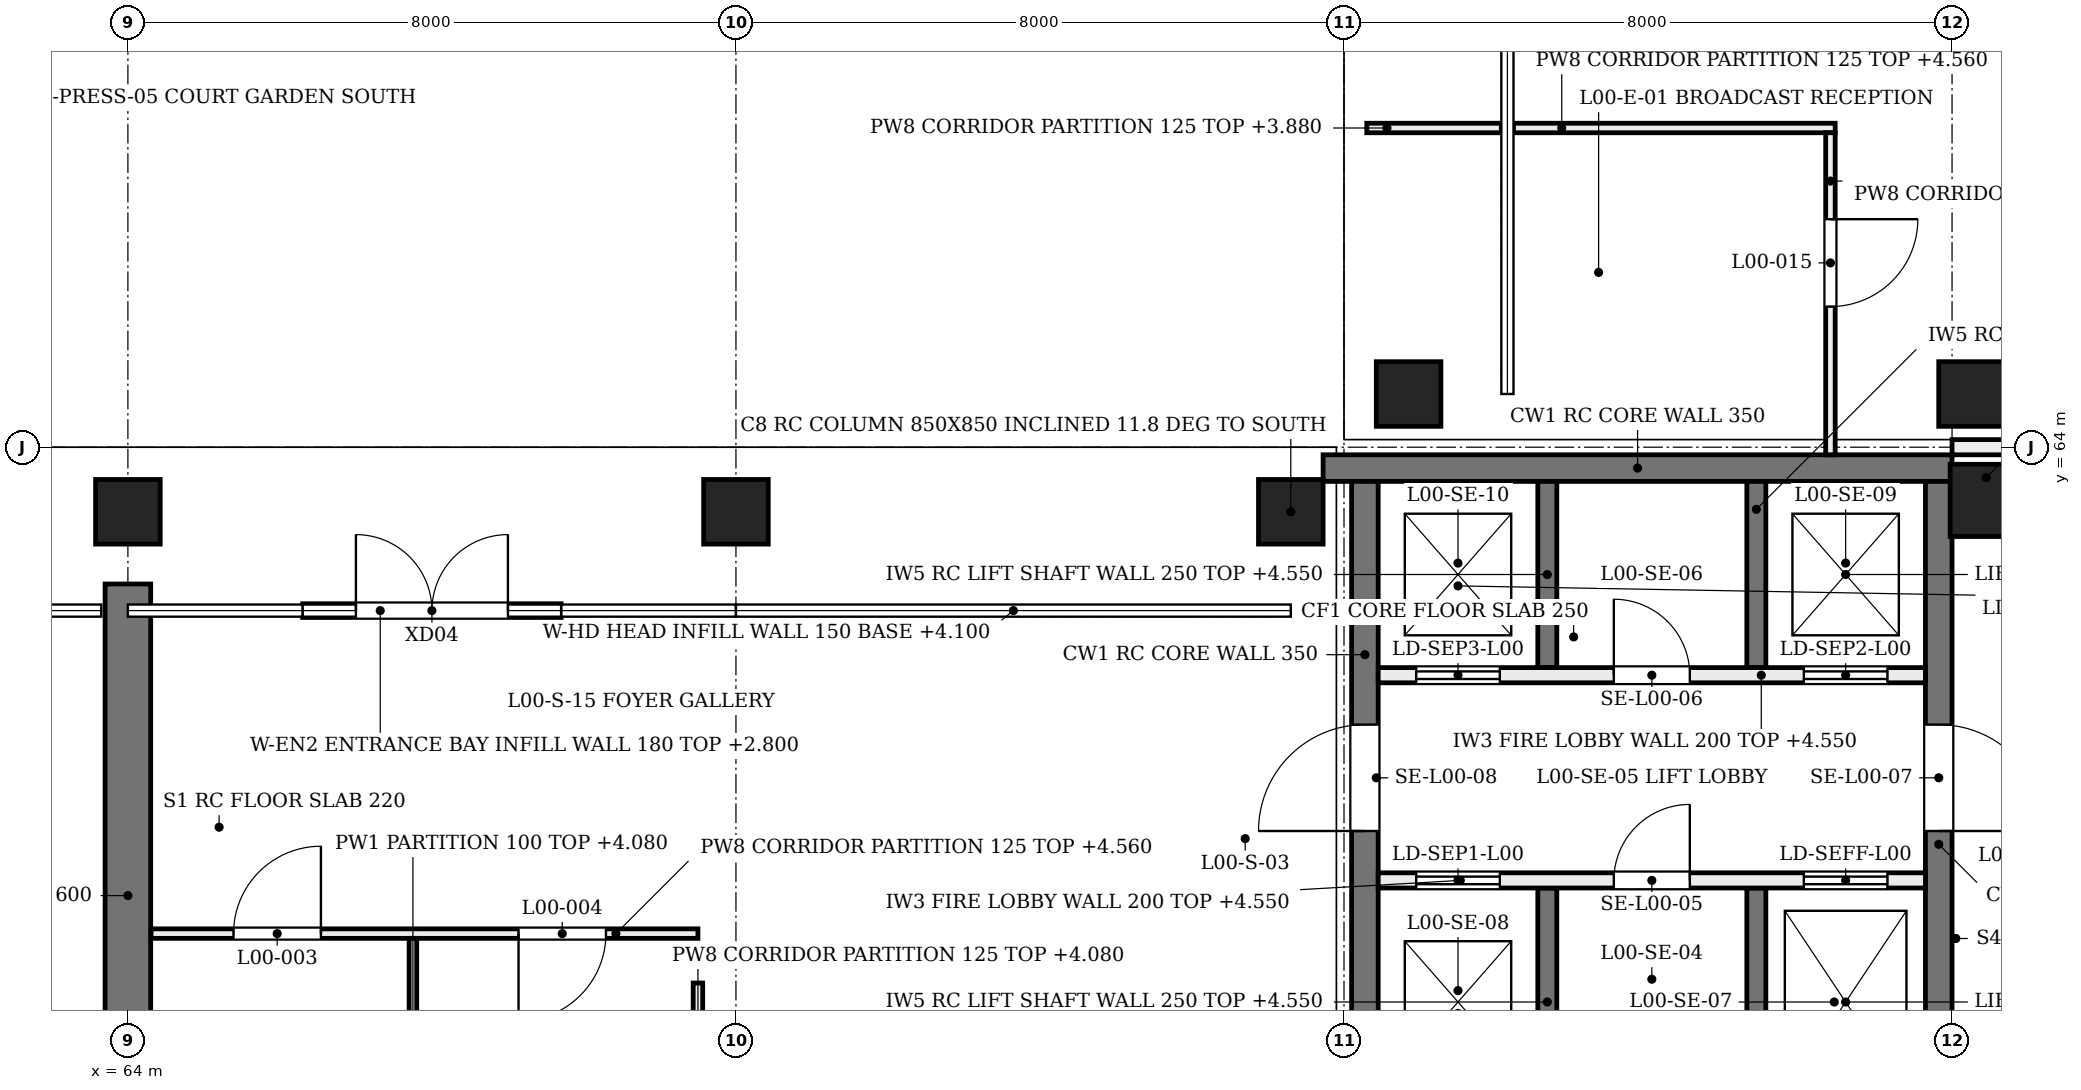
"""IFC4 building model, lengths in metres.
Left out: names, types, materials, properties, quantities, classifications, styles, units other than length and angle.
Written with IfcOpenShell. Run it as: python <this file> out.ifc"""

import sys

from ifc_helpers import new_model, si_unit, direction, frame, frame_2d, origin, origin_2d, place, context, subcontext, project, spatial, rectangle, extrude, element, fill, save


model = new_model("IFC4")
c1 = context("Model", 3, precision=1e-05, world=origin(), true_north=direction((0.0, 1.0)))
c2 = subcontext(c1, "Body", "Model", "MODEL_VIEW")
j1 = project(units=[si_unit("LENGTHUNIT", "METRE"), si_unit("PLANEANGLEUNIT", "RADIAN")], contexts=[c1])
p1 = place(None, origin())
s1 = spatial("IfcSite", under=j1, at=p1, CompositionType="ELEMENT")
p2 = place(p1, origin())
s2 = spatial("IfcBuilding", under=s1, at=p2, CompositionType="ELEMENT")
p3 = place(p2, origin())
s3 = spatial("IfcBuildingStorey", under=s2, at=p3, CompositionType="ELEMENT", Elevation=0.0)
p4 = place(p3, frame((64.0, 49.2, 0.0), z_axis=(0.0, 0.0, 1.0), x_axis=(0.0, 1.0, 0.0)))
e1 = element("IfcWall", 1, at=p4, inside=s3, PredefinedType="SHEAR", context=c2, shape_type="SweptSolid", body=[
    extrude(rectangle(XDim=13.0, YDim=0.6, at=frame_2d((6.5, 0.0))), origin(), (0.0, 0.0, 1.0), 4.58),
])
p5 = place(p3, frame((79.725, 63.725, 0.0), z_axis=(0.0, 0.0, 1.0), x_axis=(1.0, 0.0, 0.0)))
e2 = element("IfcWall", 2, at=p5, inside=s3, PredefinedType="SHEAR", context=c2, shape_type="SweptSolid", body=[
    extrude(rectangle(XDim=8.275, YDim=0.35, at=frame_2d((4.137, 0.0))), origin(), (0.0, 0.0, 1.0), 4.58),
])
p6 = place(p3, frame((80.275, 48.35, 0.0), z_axis=(0.0, 0.0, 1.0), x_axis=(0.0, 1.0, 0.0)))
e3 = element("IfcWall", 3, at=p6, inside=s3, PredefinedType="SHEAR", context=c2, shape_type="SweptSolid", body=[
    extrude(rectangle(XDim=15.2, YDim=0.35, at=frame_2d((7.6, 0.0))), origin(), (0.0, 0.0, 1.0), 4.58),
])
p7 = place(p6, frame((0.95, 0.0, 0.0)))
e4 = element("IfcOpeningElement", 4, at=p7, cuts=e3, PredefinedType="OPENING", context=c2, shape_type="SweptSolid", body=[
    extrude(rectangle(XDim=1.0, YDim=2.1, at=frame_2d((0.5, 1.05))), frame((0.0, 0.185, 0.0), z_axis=(0.0, -1.0, 0.0), x_axis=(1.0, 0.0, 0.0)), (0.0, 0.0, 1.0), 0.37),
])
p8 = place(p6, frame((10.6, 0.0, 0.0)))
e5 = element("IfcOpeningElement", 5, at=p8, cuts=e3, PredefinedType="OPENING", context=c2, shape_type="SweptSolid", body=[
    extrude(rectangle(XDim=1.4, YDim=2.1, at=frame_2d((0.7, 1.05))), frame((0.0, 0.185, 0.0), z_axis=(0.0, -1.0, 0.0), x_axis=(1.0, 0.0, 0.0)), (0.0, 0.0, 1.0), 0.37),
])
p9 = place(p3, frame((87.825, 48.35, 0.0), z_axis=(0.0, 0.0, 1.0), x_axis=(0.0, 1.0, 0.0)))
e6 = element("IfcWall", 6, at=p9, inside=s3, PredefinedType="SHEAR", context=c2, shape_type="SweptSolid", body=[
    extrude(rectangle(XDim=15.2, YDim=0.35, at=frame_2d((7.6, 0.0))), origin(), (0.0, 0.0, 1.0), 4.58),
])
p10 = place(p9, frame((0.95, 0.0, 0.0)))
e7 = element("IfcOpeningElement", 7, at=p10, cuts=e6, PredefinedType="OPENING", context=c2, shape_type="SweptSolid", body=[
    extrude(rectangle(XDim=1.0, YDim=2.1, at=frame_2d((0.5, 1.05))), frame((0.0, 0.185, 0.0), z_axis=(0.0, -1.0, 0.0), x_axis=(1.0, 0.0, 0.0)), (0.0, 0.0, 1.0), 0.37),
])
p11 = place(p9, frame((10.6, 0.0, 0.0)))
e8 = element("IfcOpeningElement", 8, at=p11, cuts=e6, PredefinedType="OPENING", context=c2, shape_type="SweptSolid", body=[
    extrude(rectangle(XDim=1.4, YDim=2.1, at=frame_2d((0.7, 1.05))), frame((0.0, 0.185, 0.0), z_axis=(0.0, -1.0, 0.0), x_axis=(1.0, 0.0, 0.0)), (0.0, 0.0, 1.0), 0.37),
])
p12 = place(p3, frame((88.45, 63.3, 0.0), z_axis=(0.0, 0.0, 1.0), x_axis=(1.0, 0.0, 0.0)))
e9 = element("IfcColumn", 9, at=p12, inside=s3, PredefinedType="COLUMN", context=c2, shape_type="SweptSolid", body=[
    extrude(rectangle(XDim=0.95, YDim=0.95, at=origin_2d()), origin(), (0.0, 0.0, 1.0), 4.8),
])
for number, where, z_axis, x_axis in (
    (10, (64.0, 63.4, 0.0), (0.0, -0.204, 0.979), (1.0, 0.0, 0.0)),
    (11, (72.0, 63.4, 0.0), (0.0, -0.204, 0.979), (1.0, 0.0, 0.0)),
    (12, (79.3, 63.4, 0.0), (0.0, -0.204, 0.979), (1.0, 0.0, 0.0)),
):
    element("IfcColumn", number, at=place(p3, frame(where, z_axis=z_axis, x_axis=x_axis)), inside=s3, PredefinedType="COLUMN", context=c2, shape_type="SweptSolid", body=[
        extrude(rectangle(XDim=0.85, YDim=0.85, at=origin_2d()), origin(), (0.0, 0.0, 1.0), 4.903),
    ])
for number, where, z_axis, x_axis in (
    (13, (80.267, 64.7, -1.6), (0.204, 0.0, 0.979), (0.0, 1.0, 0.0)),
    (14, (87.667, 64.7, -1.6), (0.204, 0.0, 0.979), (0.0, 1.0, 0.0)),
):
    element("IfcColumn", number, at=place(p3, frame(where, z_axis=z_axis, x_axis=x_axis)), inside=s3, PredefinedType="COLUMN", context=c2, shape_type="SweptSolid", body=[
        extrude(rectangle(XDim=0.85, YDim=0.85, at=origin_2d()), origin(), (0.0, 0.0, 1.0), 6.538),
    ])
p13 = place(p3, frame((66.3, 61.85, 0.0), z_axis=(0.0, 0.0, 1.0), x_axis=(1.0, 0.0, 0.0)))
e15 = element("IfcWall", 15, at=p13, inside=s3, PredefinedType="SOLIDWALL", context=c2, shape_type="SweptSolid", body=[
    extrude(rectangle(XDim=3.4, YDim=0.18, at=frame_2d((1.7, 0.0))), origin(), (0.0, 0.0, 1.0), 2.8),
])
p14 = place(p13, frame((0.7, 0.0, 0.0)))
e16 = element("IfcOpeningElement", 16, at=p14, cuts=e15, PredefinedType="OPENING", context=c2, shape_type="SweptSolid", body=[
    extrude(rectangle(XDim=2.0, YDim=2.4, at=frame_2d((1.0, 1.2))), frame((0.0, 0.1, 0.0), z_axis=(0.0, -1.0, 0.0), x_axis=(1.0, 0.0, 0.0)), (0.0, 0.0, 1.0), 0.2),
])
for number, where, z_axis, x_axis in (
    (17, (72.2, 61.85, 4.1), (0.0, 0.0, 1.0), (1.0, 0.0, 0.0)),
    (18, (82.15, 64.9, 4.1), (0.0, 0.0, 1.0), (0.0, 1.0, 0.0)),
):
    element("IfcWall", number, at=place(p3, frame(where, z_axis=z_axis, x_axis=x_axis)), inside=s3, PredefinedType="SOLIDWALL", context=c2, shape_type="SweptSolid", body=[
        extrude(rectangle(XDim=6.9, YDim=0.15, at=frame_2d((3.45, 0.0))), origin(), (0.0, 0.0, 1.0), 0.48),
    ])
p15 = place(p3, frame((85.425, 55.2, 0.0), z_axis=(0.0, 0.0, 1.0), x_axis=(0.0, 1.0, 0.0)))
e19 = element("IfcWall", 19, at=p15, inside=s3, PredefinedType="SOLIDWALL", context=c2, shape_type="SweptSolid", body=[
    extrude(rectangle(XDim=3.0, YDim=0.25, at=frame_2d((1.5, 0.0))), origin(), (0.0, 0.0, 1.0), 4.55),
])
p16 = place(p3, frame((85.425, 61.1, 0.0), z_axis=(0.0, 0.0, 1.0), x_axis=(0.0, 1.0, 0.0)))
e20 = element("IfcWall", 20, at=p16, inside=s3, PredefinedType="SOLIDWALL", context=c2, shape_type="SweptSolid", body=[
    extrude(rectangle(XDim=2.45, YDim=0.25, at=frame_2d((1.225, 0.0))), origin(), (0.0, 0.0, 1.0), 4.55),
])
p17 = place(p3, frame((82.675, 55.2, 0.0), z_axis=(0.0, 0.0, 1.0), x_axis=(0.0, 1.0, 0.0)))
e21 = element("IfcWall", 21, at=p17, inside=s3, PredefinedType="SOLIDWALL", context=c2, shape_type="SweptSolid", body=[
    extrude(rectangle(XDim=3.0, YDim=0.25, at=frame_2d((1.5, 0.0))), origin(), (0.0, 0.0, 1.0), 4.55),
])
p18 = place(p3, frame((82.675, 61.1, 0.0), z_axis=(0.0, 0.0, 1.0), x_axis=(0.0, 1.0, 0.0)))
e22 = element("IfcWall", 22, at=p18, inside=s3, PredefinedType="SOLIDWALL", context=c2, shape_type="SweptSolid", body=[
    extrude(rectangle(XDim=2.45, YDim=0.25, at=frame_2d((1.225, 0.0))), origin(), (0.0, 0.0, 1.0), 4.55),
])
p19 = place(p3, frame((87.65, 58.3, 0.0), z_axis=(0.0, 0.0, 1.0), x_axis=(-1.0, 0.0, 0.0)))
e23 = element("IfcWall", 23, at=p19, inside=s3, PredefinedType="SOLIDWALL", context=c2, shape_type="SweptSolid", body=[
    extrude(rectangle(XDim=7.2, YDim=0.2, at=frame_2d((3.6, 0.0))), origin(), (0.0, 0.0, 1.0), 4.55),
])
p20 = place(p19, frame((0.5, 0.0, 0.0)))
e24 = element("IfcOpeningElement", 24, at=p20, cuts=e23, PredefinedType="OPENING", context=c2, shape_type="SweptSolid", body=[
    extrude(rectangle(XDim=1.1, YDim=2.1, at=frame_2d((0.55, 1.05))), frame((0.0, 0.11, 0.0), z_axis=(0.0, -1.0, 0.0), x_axis=(1.0, 0.0, 0.0)), (0.0, 0.0, 1.0), 0.22),
])
p21 = place(p19, frame((5.6, 0.0, 0.0)))
e25 = element("IfcOpeningElement", 25, at=p21, cuts=e23, PredefinedType="OPENING", context=c2, shape_type="SweptSolid", body=[
    extrude(rectangle(XDim=1.1, YDim=2.1, at=frame_2d((0.55, 1.05))), frame((0.0, 0.11, 0.0), z_axis=(0.0, -1.0, 0.0), x_axis=(1.0, 0.0, 0.0)), (0.0, 0.0, 1.0), 0.22),
])
p22 = place(p19, frame((3.1, 0.0, 0.0)))
e26 = element("IfcOpeningElement", 26, at=p22, cuts=e23, PredefinedType="OPENING", context=c2, shape_type="SweptSolid", body=[
    extrude(rectangle(XDim=1.0, YDim=2.1, at=frame_2d((0.5, 1.05))), frame((0.0, 0.11, 0.0), z_axis=(0.0, -1.0, 0.0), x_axis=(1.0, 0.0, 0.0)), (0.0, 0.0, 1.0), 0.22),
])
p23 = place(p3, frame((87.65, 61.0, 0.0), z_axis=(0.0, 0.0, 1.0), x_axis=(-1.0, 0.0, 0.0)))
e27 = element("IfcWall", 27, at=p23, inside=s3, PredefinedType="SOLIDWALL", context=c2, shape_type="SweptSolid", body=[
    extrude(rectangle(XDim=7.2, YDim=0.2, at=frame_2d((3.6, 0.0))), origin(), (0.0, 0.0, 1.0), 4.55),
])
p24 = place(p23, frame((0.5, 0.0, 0.0)))
e28 = element("IfcOpeningElement", 28, at=p24, cuts=e27, PredefinedType="OPENING", context=c2, shape_type="SweptSolid", body=[
    extrude(rectangle(XDim=1.1, YDim=2.1, at=frame_2d((0.55, 1.05))), frame((0.0, 0.11, 0.0), z_axis=(0.0, -1.0, 0.0), x_axis=(1.0, 0.0, 0.0)), (0.0, 0.0, 1.0), 0.22),
])
p25 = place(p23, frame((5.6, 0.0, 0.0)))
e29 = element("IfcOpeningElement", 29, at=p25, cuts=e27, PredefinedType="OPENING", context=c2, shape_type="SweptSolid", body=[
    extrude(rectangle(XDim=1.1, YDim=2.1, at=frame_2d((0.55, 1.05))), frame((0.0, 0.11, 0.0), z_axis=(0.0, -1.0, 0.0), x_axis=(1.0, 0.0, 0.0)), (0.0, 0.0, 1.0), 0.22),
])
p26 = place(p23, frame((3.1, 0.0, 0.0)))
e30 = element("IfcOpeningElement", 30, at=p26, cuts=e27, PredefinedType="OPENING", context=c2, shape_type="SweptSolid", body=[
    extrude(rectangle(XDim=1.0, YDim=2.1, at=frame_2d((0.5, 1.05))), frame((0.0, 0.11, 0.0), z_axis=(0.0, -1.0, 0.0), x_axis=(1.0, 0.0, 0.0)), (0.0, 0.0, 1.0), 0.22),
])
p27 = place(p3, frame((71.5, 51.8, 0.0), z_axis=(0.0, 0.0, 1.0), x_axis=(0.0, 1.0, 0.0)))
e31 = element("IfcWall", 31, at=p27, inside=s3, PredefinedType="PARTITIONING", context=c2, shape_type="SweptSolid", body=[
    extrude(rectangle(XDim=5.15, YDim=0.125, at=frame_2d((2.575, 0.0))), origin(), (0.0, 0.0, 1.0), 4.08),
])
p28 = place(p3, frame((64.305, 57.6, 0.0), z_axis=(0.0, 0.0, 1.0), x_axis=(1.0, 0.0, 0.0)))
e32 = element("IfcWall", 32, at=p28, inside=s3, PredefinedType="PARTITIONING", context=c2, shape_type="SweptSolid", body=[
    extrude(rectangle(XDim=7.195, YDim=0.125, at=frame_2d((3.598, 0.0))), origin(), (0.0, 0.0, 1.0), 4.56),
])
p29 = place(p28, frame((1.084, 0.0, 0.0)))
e33 = element("IfcOpeningElement", 33, at=p29, cuts=e32, PredefinedType="OPENING", context=c2, shape_type="SweptSolid", body=[
    extrude(rectangle(XDim=1.15, YDim=2.1, at=frame_2d((0.575, 1.05))), frame((0.0, 0.073, 0.0), z_axis=(0.0, -1.0, 0.0), x_axis=(1.0, 0.0, 0.0)), (0.0, 0.0, 1.0), 0.145),
])
p30 = place(p28, frame((4.834, 0.0, 0.0)))
e34 = element("IfcOpeningElement", 34, at=p30, cuts=e32, PredefinedType="OPENING", context=c2, shape_type="SweptSolid", body=[
    extrude(rectangle(XDim=1.15, YDim=2.1, at=frame_2d((0.575, 1.05))), frame((0.0, 0.073, 0.0), z_axis=(0.0, -1.0, 0.0), x_axis=(1.0, 0.0, 0.0)), (0.0, 0.0, 1.0), 0.145),
])
p31 = place(p3, frame((67.75, 50.655, 0.0), z_axis=(0.0, 0.0, 1.0), x_axis=(0.0, 1.0, 0.0)))
e35 = element("IfcWall", 35, at=p31, inside=s3, PredefinedType="PARTITIONING", context=c2, shape_type="SweptSolid", body=[
    extrude(rectangle(XDim=6.883, YDim=0.1, at=frame_2d((3.441, 0.0))), origin(), (0.0, 0.0, 1.0), 4.08),
])
p32 = place(p3, frame((80.3, 68.2, 0.0), z_axis=(0.0, 0.0, 1.0), x_axis=(1.0, 0.0, 0.0)))
e36 = element("IfcWall", 36, at=p32, inside=s3, PredefinedType="PARTITIONING", context=c2, shape_type="SweptSolid", body=[
    extrude(rectangle(XDim=1.77, YDim=0.125, at=frame_2d((0.885, 0.0))), origin(), (0.0, 0.0, 1.0), 3.88),
])
p33 = place(p3, frame((82.23, 68.2, 0.0), z_axis=(0.0, 0.0, 1.0), x_axis=(1.0, 0.0, 0.0)))
e37 = element("IfcWall", 37, at=p33, inside=s3, PredefinedType="PARTITIONING", context=c2, shape_type="SweptSolid", body=[
    extrude(rectangle(XDim=4.232, YDim=0.125, at=frame_2d((2.116, 0.0))), origin(), (0.0, 0.0, 1.0), 4.56),
])
p34 = place(p3, frame((86.4, 63.9, 0.0), z_axis=(0.0, 0.0, 1.0), x_axis=(0.0, 1.0, 0.0)))
e38 = element("IfcWall", 38, at=p34, inside=s3, PredefinedType="PARTITIONING", context=c2, shape_type="SweptSolid", body=[
    extrude(rectangle(XDim=4.238, YDim=0.125, at=frame_2d((2.119, 0.0))), origin(), (0.0, 0.0, 1.0), 3.88),
])
p35 = place(p34, frame((1.95, 0.0, 0.0)))
e39 = element("IfcOpeningElement", 39, at=p35, cuts=e38, PredefinedType="OPENING", context=c2, shape_type="SweptSolid", body=[
    extrude(rectangle(XDim=1.15, YDim=2.1, at=frame_2d((0.575, 1.05))), frame((0.0, 0.073, 0.0), z_axis=(0.0, -1.0, 0.0), x_axis=(1.0, 0.0, 0.0)), (0.0, 0.0, 1.0), 0.145),
])
p36 = place(p3, frame((88.0, 64.0, 0.0), z_axis=(0.0, 0.0, 1.0), x_axis=(1.0, 0.0, 0.0)))
e40 = element("IfcWall", 40, at=p36, inside=s3, PredefinedType="PARTITIONING", context=c2, shape_type="SweptSolid", body=[
    extrude(rectangle(XDim=3.6, YDim=0.2, at=frame_2d((1.8, 0.0))), origin(), (0.0, 0.0, 1.0), 3.88),
])
p37 = place(p36, frame((1.55, 0.0, 0.0)))
e41 = element("IfcOpeningElement", 41, at=p37, cuts=e40, PredefinedType="OPENING", context=c2, shape_type="SweptSolid", body=[
    extrude(rectangle(XDim=1.0, YDim=2.1, at=frame_2d((0.5, 1.05))), frame((0.0, 0.11, 0.0), z_axis=(0.0, -1.0, 0.0), x_axis=(1.0, 0.0, 0.0)), (0.0, 0.0, 1.0), 0.22),
])
p38 = place(p14, origin())
e42 = element("IfcDoor", 42, at=p38, inside=s3, OperationType="SINGLE_SWING_LEFT", PredefinedType="DOOR", context=c2, shape_type="SweptSolid", body=[
    extrude(rectangle(XDim=2.0, YDim=2.4, at=frame_2d((1.0, 1.2))), frame((0.0, 0.025, 0.0), z_axis=(0.0, -1.0, 0.0), x_axis=(1.0, 0.0, 0.0)), (0.0, 0.0, 1.0), 0.05),
])
fill(e16, e42)
p39 = place(p20, frame((1.1, 0.0, 0.0), z_axis=(0.0, 0.0, 1.0), x_axis=(-1.0, 0.0, 0.0)))
e43 = element("IfcDoor", 43, at=p39, inside=s3, OperationType="DOUBLE_DOOR_SLIDING", PredefinedType="DOOR", context=c2, shape_type="SweptSolid", body=[
    extrude(rectangle(XDim=1.1, YDim=2.1, at=frame_2d((0.55, 1.05))), frame((0.0, 0.025, 0.0), z_axis=(0.0, -1.0, 0.0), x_axis=(1.0, 0.0, 0.0)), (0.0, 0.0, 1.0), 0.05),
])
fill(e24, e43)
p40 = place(p21, frame((1.1, 0.0, 0.0), z_axis=(0.0, 0.0, 1.0), x_axis=(-1.0, 0.0, 0.0)))
e44 = element("IfcDoor", 44, at=p40, inside=s3, OperationType="DOUBLE_DOOR_SLIDING", PredefinedType="DOOR", context=c2, shape_type="SweptSolid", body=[
    extrude(rectangle(XDim=1.1, YDim=2.1, at=frame_2d((0.55, 1.05))), frame((0.0, 0.025, 0.0), z_axis=(0.0, -1.0, 0.0), x_axis=(1.0, 0.0, 0.0)), (0.0, 0.0, 1.0), 0.05),
])
fill(e25, e44)
p41 = place(p24, origin())
e45 = element("IfcDoor", 45, at=p41, inside=s3, OperationType="DOUBLE_DOOR_SLIDING", PredefinedType="DOOR", context=c2, shape_type="SweptSolid", body=[
    extrude(rectangle(XDim=1.1, YDim=2.1, at=frame_2d((0.55, 1.05))), frame((0.0, 0.025, 0.0), z_axis=(0.0, -1.0, 0.0), x_axis=(1.0, 0.0, 0.0)), (0.0, 0.0, 1.0), 0.05),
])
fill(e28, e45)
p42 = place(p25, origin())
e46 = element("IfcDoor", 46, at=p42, inside=s3, OperationType="DOUBLE_DOOR_SLIDING", PredefinedType="DOOR", context=c2, shape_type="SweptSolid", body=[
    extrude(rectangle(XDim=1.1, YDim=2.1, at=frame_2d((0.55, 1.05))), frame((0.0, 0.025, 0.0), z_axis=(0.0, -1.0, 0.0), x_axis=(1.0, 0.0, 0.0)), (0.0, 0.0, 1.0), 0.05),
])
fill(e29, e46)
p43 = place(p22, frame((1.0, 0.0, 0.0), z_axis=(0.0, 0.0, 1.0), x_axis=(-1.0, 0.0, 0.0)))
e47 = element("IfcDoor", 47, at=p43, inside=s3, OperationType="SINGLE_SWING_LEFT", PredefinedType="DOOR", context=c2, shape_type="SweptSolid", body=[
    extrude(rectangle(XDim=1.0, YDim=2.1, at=frame_2d((0.5, 1.05))), frame((0.0, 0.025, 0.0), z_axis=(0.0, -1.0, 0.0), x_axis=(1.0, 0.0, 0.0)), (0.0, 0.0, 1.0), 0.05),
])
fill(e26, e47)
p44 = place(p26, origin())
e48 = element("IfcDoor", 48, at=p44, inside=s3, OperationType="SINGLE_SWING_RIGHT", PredefinedType="DOOR", context=c2, shape_type="SweptSolid", body=[
    extrude(rectangle(XDim=1.0, YDim=2.1, at=frame_2d((0.5, 1.05))), frame((0.0, 0.025, 0.0), z_axis=(0.0, -1.0, 0.0), x_axis=(1.0, 0.0, 0.0)), (0.0, 0.0, 1.0), 0.05),
])
fill(e30, e48)
p45 = place(p11, frame((1.4, 0.0, 0.0), z_axis=(0.0, 0.0, 1.0), x_axis=(-1.0, 0.0, 0.0)))
e49 = element("IfcDoor", 49, at=p45, inside=s3, OperationType="SINGLE_SWING_LEFT", PredefinedType="DOOR", context=c2, shape_type="SweptSolid", body=[
    extrude(rectangle(XDim=1.4, YDim=2.1, at=frame_2d((0.7, 1.05))), frame((0.0, 0.025, 0.0), z_axis=(0.0, -1.0, 0.0), x_axis=(1.0, 0.0, 0.0)), (0.0, 0.0, 1.0), 0.05),
])
fill(e8, e49)
p46 = place(p8, origin())
e50 = element("IfcDoor", 50, at=p46, inside=s3, OperationType="SINGLE_SWING_LEFT", PredefinedType="DOOR", context=c2, shape_type="SweptSolid", body=[
    extrude(rectangle(XDim=1.4, YDim=2.1, at=frame_2d((0.7, 1.05))), frame((0.0, 0.025, 0.0), z_axis=(0.0, -1.0, 0.0), x_axis=(1.0, 0.0, 0.0)), (0.0, 0.0, 1.0), 0.05),
])
fill(e5, e50)
p47 = place(p29, frame((1.15, 0.0, 0.0), z_axis=(0.0, 0.0, 1.0), x_axis=(-1.0, 0.0, 0.0)))
e51 = element("IfcDoor", 51, at=p47, inside=s3, OperationType="SINGLE_SWING_RIGHT", PredefinedType="DOOR", context=c2, shape_type="SweptSolid", body=[
    extrude(rectangle(XDim=1.15, YDim=2.1, at=frame_2d((0.575, 1.05))), frame((0.0, 0.025, 0.0), z_axis=(0.0, -1.0, 0.0), x_axis=(1.0, 0.0, 0.0)), (0.0, 0.0, 1.0), 0.05),
])
fill(e33, e51)
p48 = place(p30, frame((1.15, 0.0, 0.0), z_axis=(0.0, 0.0, 1.0), x_axis=(-1.0, 0.0, 0.0)))
e52 = element("IfcDoor", 52, at=p48, inside=s3, OperationType="SINGLE_SWING_LEFT", PredefinedType="DOOR", context=c2, shape_type="SweptSolid", body=[
    extrude(rectangle(XDim=1.15, YDim=2.1, at=frame_2d((0.575, 1.05))), frame((0.0, 0.025, 0.0), z_axis=(0.0, -1.0, 0.0), x_axis=(1.0, 0.0, 0.0)), (0.0, 0.0, 1.0), 0.05),
])
fill(e34, e52)
p49 = place(p35, origin())
e53 = element("IfcDoor", 53, at=p49, inside=s3, OperationType="SINGLE_SWING_RIGHT", PredefinedType="DOOR", context=c2, shape_type="SweptSolid", body=[
    extrude(rectangle(XDim=1.15, YDim=2.1, at=frame_2d((0.575, 1.05))), frame((0.0, 0.025, 0.0), z_axis=(0.0, -1.0, 0.0), x_axis=(1.0, 0.0, 0.0)), (0.0, 0.0, 1.0), 0.05),
])
fill(e39, e53)
save(model, sys.argv[1])
